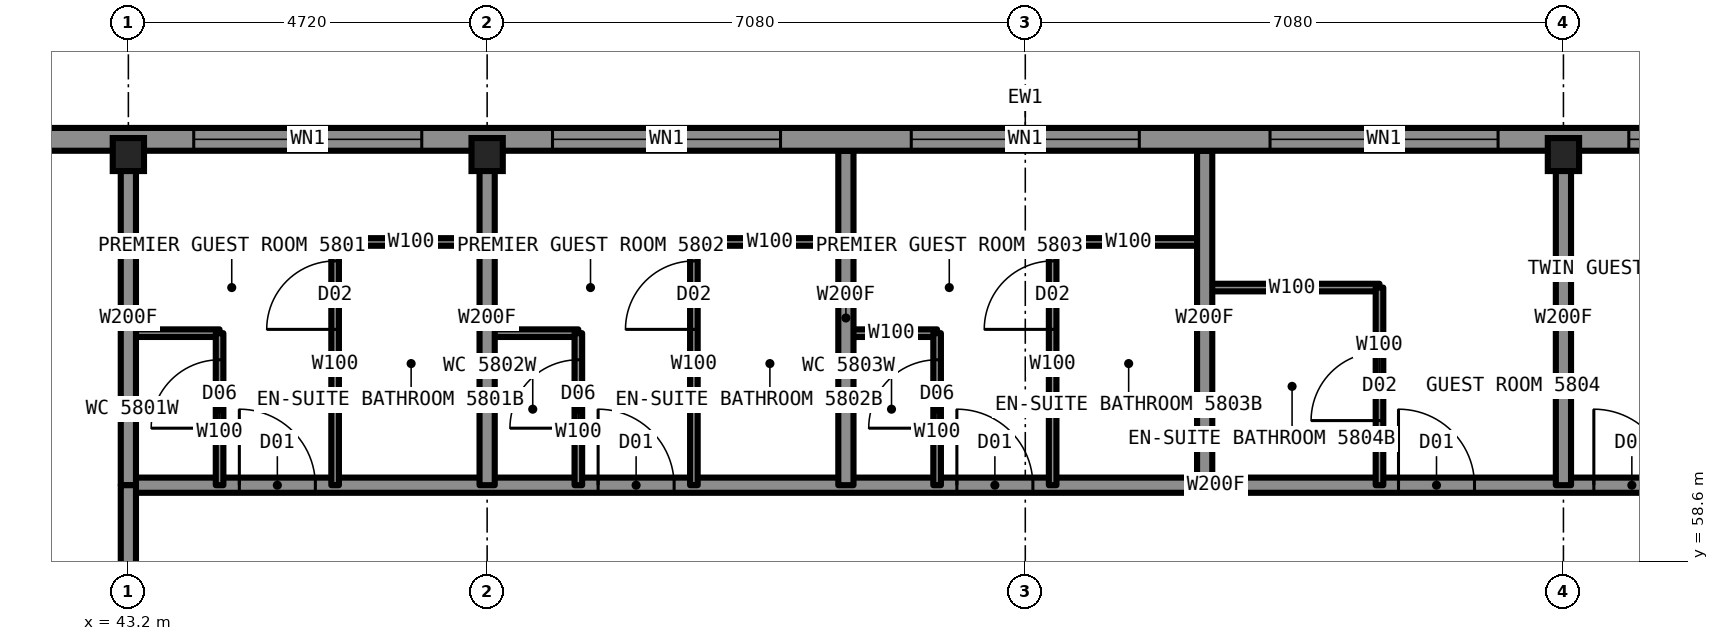
"""IFC4 building model, lengths in metres.
Left out: names, types, materials, properties, quantities, classifications, styles, units other than length and angle.
Written with IfcOpenShell. Run it as: python <this file> out.ifc"""

import sys

from ifc_helpers import new_model, si_unit, direction, frame, frame_2d, origin, origin_2d, place, context, subcontext, project, spatial, rectangle, i_section, extrude, element, fill, save


model = new_model("IFC4")
c1 = context("Model", 3, precision=1e-05, world=origin(), true_north=direction((0.0, 1.0)))
c2 = subcontext(c1, "Body", "Model", "MODEL_VIEW")
j1 = project(units=[si_unit("LENGTHUNIT", "METRE"), si_unit("PLANEANGLEUNIT", "RADIAN")], contexts=[c1])
p1 = place(None, origin())
s1 = spatial("IfcSite", under=j1, at=p1, CompositionType="ELEMENT")
p2 = place(p1, origin())
s2 = spatial("IfcBuilding", under=s1, at=p2, CompositionType="ELEMENT")
p3 = place(p2, frame((0.0, 0.0, 214.3)))
s3 = spatial("IfcBuildingStorey", under=s2, at=p3, CompositionType="ELEMENT", Elevation=214.3)
for number, where, z_axis, x_axis in (
    (1, (43.2, 63.95, 0.0), (0.0, 0.0, 1.0), (1.0, 0.0, 0.0)),
    (2, (47.92, 63.95, 0.0), (0.0, 0.0, 1.0), (1.0, 0.0, 0.0)),
    (3, (62.08, 63.95, 0.0), (0.0, 0.0, 1.0), (1.0, 0.0, 0.0)),
):
    element("IfcColumn", number, at=place(p3, frame(where, z_axis=z_axis, x_axis=x_axis)), inside=s3, PredefinedType="COLUMN", context=c2, shape_type="SweptSolid", body=[
        extrude(i_section(OverallWidth=0.411, OverallDepth=0.434, WebThickness=0.036, FlangeThickness=0.057, at=origin_2d()), origin(), (0.0, 0.0, 1.0), 3.5),
    ])
p4 = place(p3, frame((43.2, 59.6, 0.0), z_axis=(0.0, 0.0, 1.0), x_axis=(1.0, 0.0, 0.0)))
e4 = element("IfcWall", 4, at=p4, inside=s3, PredefinedType="PARTITIONING", context=c2, shape_type="SweptSolid", body=[
    extrude(rectangle(XDim=23.6, YDim=0.2, at=frame_2d((11.8, 0.0))), origin(), (0.0, 0.0, 1.0), 3.33),
])
p5 = place(p4, frame((1.46, 0.0, 0.0)))
e5 = element("IfcOpeningElement", 5, at=p5, cuts=e4, PredefinedType="OPENING", context=c2, shape_type="SweptSolid", body=[
    extrude(rectangle(XDim=1.0, YDim=2.2, at=frame_2d((0.5, 1.1))), frame((0.0, 0.11, 0.0), z_axis=(0.0, -1.0, 0.0), x_axis=(1.0, 0.0, 0.0)), (0.0, 0.0, 1.0), 0.22),
])
p6 = place(p4, frame((6.18, 0.0, 0.0)))
e6 = element("IfcOpeningElement", 6, at=p6, cuts=e4, PredefinedType="OPENING", context=c2, shape_type="SweptSolid", body=[
    extrude(rectangle(XDim=1.0, YDim=2.2, at=frame_2d((0.5, 1.1))), frame((0.0, 0.11, 0.0), z_axis=(0.0, -1.0, 0.0), x_axis=(1.0, 0.0, 0.0)), (0.0, 0.0, 1.0), 0.22),
])
p7 = place(p4, frame((10.9, 0.0, 0.0)))
e7 = element("IfcOpeningElement", 7, at=p7, cuts=e4, PredefinedType="OPENING", context=c2, shape_type="SweptSolid", body=[
    extrude(rectangle(XDim=1.0, YDim=2.2, at=frame_2d((0.5, 1.1))), frame((0.0, 0.11, 0.0), z_axis=(0.0, -1.0, 0.0), x_axis=(1.0, 0.0, 0.0)), (0.0, 0.0, 1.0), 0.22),
])
p8 = place(p4, frame((16.71, 0.0, 0.0)))
e8 = element("IfcOpeningElement", 8, at=p8, cuts=e4, PredefinedType="OPENING", context=c2, shape_type="SweptSolid", body=[
    extrude(rectangle(XDim=1.0, YDim=2.2, at=frame_2d((0.5, 1.1))), frame((0.0, 0.11, 0.0), z_axis=(0.0, -1.0, 0.0), x_axis=(1.0, 0.0, 0.0)), (0.0, 0.0, 1.0), 0.22),
])
p9 = place(p4, frame((19.28, 0.0, 0.0)))
e9 = element("IfcOpeningElement", 9, at=p9, cuts=e4, PredefinedType="OPENING", context=c2, shape_type="SweptSolid", body=[
    extrude(rectangle(XDim=1.0, YDim=2.2, at=frame_2d((0.5, 1.1))), frame((0.0, 0.11, 0.0), z_axis=(0.0, -1.0, 0.0), x_axis=(1.0, 0.0, 0.0)), (0.0, 0.0, 1.0), 0.22),
])
p10 = place(p3, frame((43.2, 61.6, 0.0), z_axis=(0.0, 0.0, 1.0), x_axis=(1.0, 0.0, 0.0)))
e10 = element("IfcWall", 10, at=p10, inside=s3, PredefinedType="PARTITIONING", context=c2, shape_type="SweptSolid", body=[
    extrude(rectangle(XDim=1.2, YDim=0.1, at=frame_2d((0.6, 0.0))), origin(), (0.0, 0.0, 1.0), 3.33),
])
for number, where, z_axis, x_axis in (
    (11, (47.92, 61.6, 0.0), (0.0, 0.0, 1.0), (1.0, 0.0, 0.0)),
    (12, (52.64, 61.6, 0.0), (0.0, 0.0, 1.0), (1.0, 0.0, 0.0)),
):
    element("IfcWall", number, at=place(p3, frame(where, z_axis=z_axis, x_axis=x_axis)), inside=s3, PredefinedType="PARTITIONING", context=c2, shape_type="SweptSolid", body=[
        extrude(rectangle(XDim=1.2, YDim=0.1, at=frame_2d((0.6, 0.0))), origin(), (0.0, 0.0, 1.0), 3.33),
    ])
p11 = place(p3, frame((57.36, 62.2, 0.0), z_axis=(0.0, 0.0, 1.0), x_axis=(1.0, 0.0, 0.0)))
e13 = element("IfcWall", 13, at=p11, inside=s3, PredefinedType="PARTITIONING", context=c2, shape_type="SweptSolid", body=[
    extrude(rectangle(XDim=2.3, YDim=0.1, at=frame_2d((1.15, 0.0))), origin(), (0.0, 0.0, 1.0), 3.33),
])
for number, where, z_axis, x_axis in (
    (14, (45.92, 62.8, 0.0), (0.0, 0.0, 1.0), (1.0, 0.0, 0.0)),
    (15, (50.64, 62.8, 0.0), (0.0, 0.0, 1.0), (1.0, 0.0, 0.0)),
    (16, (55.36, 62.8, 0.0), (0.0, 0.0, 1.0), (1.0, 0.0, 0.0)),
):
    element("IfcWall", number, at=place(p3, frame(where, z_axis=z_axis, x_axis=x_axis)), inside=s3, PredefinedType="PARTITIONING", context=c2, shape_type="SweptSolid", body=[
        extrude(rectangle(XDim=2.0, YDim=0.1, at=frame_2d((1.0, 0.0))), origin(), (0.0, 0.0, 1.0), 3.33),
    ])
p12 = place(p3, frame((53.84, 59.6, 0.0), z_axis=(0.0, 0.0, 1.0), x_axis=(0.0, 1.0, 0.0)))
e17 = element("IfcWall", 17, at=p12, inside=s3, PredefinedType="PARTITIONING", context=c2, shape_type="SweptSolid", body=[
    extrude(rectangle(XDim=2.0, YDim=0.1, at=frame_2d((1.0, 0.0))), origin(), (0.0, 0.0, 1.0), 3.33),
])
p13 = place(p12, frame((0.75, 0.0, 0.0)))
e18 = element("IfcOpeningElement", 18, at=p13, cuts=e17, PredefinedType="OPENING", context=c2, shape_type="SweptSolid", body=[
    extrude(rectangle(XDim=0.9, YDim=2.1, at=frame_2d((0.45, 1.05))), frame((0.0, 0.06, 0.0), z_axis=(0.0, -1.0, 0.0), x_axis=(1.0, 0.0, 0.0)), (0.0, 0.0, 1.0), 0.12),
])
p14 = place(p3, frame((44.4, 59.6, 0.0), z_axis=(0.0, 0.0, 1.0), x_axis=(0.0, 1.0, 0.0)))
e19 = element("IfcWall", 19, at=p14, inside=s3, PredefinedType="PARTITIONING", context=c2, shape_type="SweptSolid", body=[
    extrude(rectangle(XDim=2.0, YDim=0.1, at=frame_2d((1.0, 0.0))), origin(), (0.0, 0.0, 1.0), 3.33),
])
p15 = place(p14, frame((0.75, 0.0, 0.0)))
e20 = element("IfcOpeningElement", 20, at=p15, cuts=e19, PredefinedType="OPENING", context=c2, shape_type="SweptSolid", body=[
    extrude(rectangle(XDim=0.9, YDim=2.1, at=frame_2d((0.45, 1.05))), frame((0.0, 0.06, 0.0), z_axis=(0.0, -1.0, 0.0), x_axis=(1.0, 0.0, 0.0)), (0.0, 0.0, 1.0), 0.12),
])
p16 = place(p3, frame((43.2, 59.6, 0.0), z_axis=(0.0, 0.0, 1.0), x_axis=(0.0, 1.0, 0.0)))
e21 = element("IfcWall", 21, at=p16, inside=s3, PredefinedType="PARTITIONING", context=c2, shape_type="SweptSolid", body=[
    extrude(rectangle(XDim=4.4, YDim=0.2, at=frame_2d((2.2, 0.0))), origin(), (0.0, 0.0, 1.0), 2.573),
])
p17 = place(p3, frame((52.64, 59.6, 0.0), z_axis=(0.0, 0.0, 1.0), x_axis=(0.0, 1.0, 0.0)))
e22 = element("IfcWall", 22, at=p17, inside=s3, PredefinedType="PARTITIONING", context=c2, shape_type="SweptSolid", body=[
    extrude(rectangle(XDim=4.4, YDim=0.2, at=frame_2d((2.2, 0.0))), origin(), (0.0, 0.0, 1.0), 3.33),
])
p18 = place(p3, frame((50.64, 59.6, 0.0), z_axis=(0.0, 0.0, 1.0), x_axis=(0.0, 1.0, 0.0)))
e23 = element("IfcWall", 23, at=p18, inside=s3, PredefinedType="PARTITIONING", context=c2, shape_type="SweptSolid", body=[
    extrude(rectangle(XDim=3.2, YDim=0.1, at=frame_2d((1.6, 0.0))), origin(), (0.0, 0.0, 1.0), 3.33),
])
p19 = place(p18, frame((2.05, 0.0, 0.0)))
e24 = element("IfcOpeningElement", 24, at=p19, cuts=e23, PredefinedType="OPENING", context=c2, shape_type="SweptSolid", body=[
    extrude(rectangle(XDim=0.9, YDim=2.1, at=frame_2d((0.45, 1.05))), frame((0.0, 0.06, 0.0), z_axis=(0.0, -1.0, 0.0), x_axis=(1.0, 0.0, 0.0)), (0.0, 0.0, 1.0), 0.12),
])
p20 = place(p3, frame((49.12, 59.6, 0.0), z_axis=(0.0, 0.0, 1.0), x_axis=(0.0, 1.0, 0.0)))
e25 = element("IfcWall", 25, at=p20, inside=s3, PredefinedType="PARTITIONING", context=c2, shape_type="SweptSolid", body=[
    extrude(rectangle(XDim=2.0, YDim=0.1, at=frame_2d((1.0, 0.0))), origin(), (0.0, 0.0, 1.0), 3.33),
])
p21 = place(p20, frame((0.75, 0.0, 0.0)))
e26 = element("IfcOpeningElement", 26, at=p21, cuts=e25, PredefinedType="OPENING", context=c2, shape_type="SweptSolid", body=[
    extrude(rectangle(XDim=0.9, YDim=2.1, at=frame_2d((0.45, 1.05))), frame((0.0, 0.06, 0.0), z_axis=(0.0, -1.0, 0.0), x_axis=(1.0, 0.0, 0.0)), (0.0, 0.0, 1.0), 0.12),
])
p22 = place(p3, frame((47.92, 59.6, 0.0), z_axis=(0.0, 0.0, 1.0), x_axis=(0.0, 1.0, 0.0)))
e27 = element("IfcWall", 27, at=p22, inside=s3, PredefinedType="PARTITIONING", context=c2, shape_type="SweptSolid", body=[
    extrude(rectangle(XDim=4.4, YDim=0.2, at=frame_2d((2.2, 0.0))), origin(), (0.0, 0.0, 1.0), 2.573),
])
p23 = place(p3, frame((45.92, 59.6, 0.0), z_axis=(0.0, 0.0, 1.0), x_axis=(0.0, 1.0, 0.0)))
e28 = element("IfcWall", 28, at=p23, inside=s3, PredefinedType="PARTITIONING", context=c2, shape_type="SweptSolid", body=[
    extrude(rectangle(XDim=3.2, YDim=0.1, at=frame_2d((1.6, 0.0))), origin(), (0.0, 0.0, 1.0), 3.33),
])
p24 = place(p23, frame((2.05, 0.0, 0.0)))
e29 = element("IfcOpeningElement", 29, at=p24, cuts=e28, PredefinedType="OPENING", context=c2, shape_type="SweptSolid", body=[
    extrude(rectangle(XDim=0.9, YDim=2.1, at=frame_2d((0.45, 1.05))), frame((0.0, 0.06, 0.0), z_axis=(0.0, -1.0, 0.0), x_axis=(1.0, 0.0, 0.0)), (0.0, 0.0, 1.0), 0.12),
])
p25 = place(p3, frame((55.36, 59.6, 0.0), z_axis=(0.0, 0.0, 1.0), x_axis=(0.0, 1.0, 0.0)))
e30 = element("IfcWall", 30, at=p25, inside=s3, PredefinedType="PARTITIONING", context=c2, shape_type="SweptSolid", body=[
    extrude(rectangle(XDim=3.2, YDim=0.1, at=frame_2d((1.6, 0.0))), origin(), (0.0, 0.0, 1.0), 3.33),
])
p26 = place(p25, frame((2.05, 0.0, 0.0)))
e31 = element("IfcOpeningElement", 31, at=p26, cuts=e30, PredefinedType="OPENING", context=c2, shape_type="SweptSolid", body=[
    extrude(rectangle(XDim=0.9, YDim=2.1, at=frame_2d((0.45, 1.05))), frame((0.0, 0.06, 0.0), z_axis=(0.0, -1.0, 0.0), x_axis=(1.0, 0.0, 0.0)), (0.0, 0.0, 1.0), 0.12),
])
p27 = place(p3, frame((57.36, 59.6, 0.0), z_axis=(0.0, 0.0, 1.0), x_axis=(0.0, 1.0, 0.0)))
e32 = element("IfcWall", 32, at=p27, inside=s3, PredefinedType="PARTITIONING", context=c2, shape_type="SweptSolid", body=[
    extrude(rectangle(XDim=4.4, YDim=0.2, at=frame_2d((2.2, 0.0))), origin(), (0.0, 0.0, 1.0), 3.33),
])
p28 = place(p3, frame((59.66, 59.6, 0.0), z_axis=(0.0, 0.0, 1.0), x_axis=(0.0, 1.0, 0.0)))
e33 = element("IfcWall", 33, at=p28, inside=s3, PredefinedType="PARTITIONING", context=c2, shape_type="SweptSolid", body=[
    extrude(rectangle(XDim=2.6, YDim=0.1, at=frame_2d((1.3, 0.0))), origin(), (0.0, 0.0, 1.0), 3.33),
])
p29 = place(p28, frame((0.85, 0.0, 0.0)))
e34 = element("IfcOpeningElement", 34, at=p29, cuts=e33, PredefinedType="OPENING", context=c2, shape_type="SweptSolid", body=[
    extrude(rectangle(XDim=0.9, YDim=2.1, at=frame_2d((0.45, 1.05))), frame((0.0, 0.06, 0.0), z_axis=(0.0, -1.0, 0.0), x_axis=(1.0, 0.0, 0.0)), (0.0, 0.0, 1.0), 0.12),
])
p30 = place(p3, frame((62.08, 59.6, 0.0), z_axis=(0.0, 0.0, 1.0), x_axis=(0.0, 1.0, 0.0)))
e35 = element("IfcWall", 35, at=p30, inside=s3, PredefinedType="PARTITIONING", context=c2, shape_type="SweptSolid", body=[
    extrude(rectangle(XDim=4.4, YDim=0.2, at=frame_2d((2.2, 0.0))), origin(), (0.0, 0.0, 1.0), 2.573),
])
p31 = place(p3, frame((68.8, 64.15, 0.0), z_axis=(0.0, 0.0, 1.0), x_axis=(-1.0, 0.0, 0.0)))
e36 = element("IfcWall", 36, at=p31, inside=s3, PredefinedType="SOLIDWALL", context=c2, shape_type="SweptSolid", body=[
    extrude(rectangle(XDim=27.6, YDim=0.3, at=frame_2d((13.8, 0.0))), origin(), (0.0, 0.0, 1.0), 2.63),
])
p32 = place(p31, frame((2.86, 0.0, 0.3)))
e37 = element("IfcOpeningElement", 37, at=p32, cuts=e36, PredefinedType="OPENING", context=c2, shape_type="SweptSolid", body=[
    extrude(rectangle(XDim=3.0, YDim=2.0, at=frame_2d((1.5, 1.0))), frame((0.0, 0.16, 0.0), z_axis=(0.0, -1.0, 0.0), x_axis=(1.0, 0.0, 0.0)), (0.0, 0.0, 1.0), 0.32),
])
p33 = place(p31, frame((7.58, 0.0, 0.3)))
e38 = element("IfcOpeningElement", 38, at=p33, cuts=e36, PredefinedType="OPENING", context=c2, shape_type="SweptSolid", body=[
    extrude(rectangle(XDim=3.0, YDim=2.0, at=frame_2d((1.5, 1.0))), frame((0.0, 0.16, 0.0), z_axis=(0.0, -1.0, 0.0), x_axis=(1.0, 0.0, 0.0)), (0.0, 0.0, 1.0), 0.32),
])
p34 = place(p31, frame((12.3, 0.0, 0.3)))
e39 = element("IfcOpeningElement", 39, at=p34, cuts=e36, PredefinedType="OPENING", context=c2, shape_type="SweptSolid", body=[
    extrude(rectangle(XDim=3.0, YDim=2.0, at=frame_2d((1.5, 1.0))), frame((0.0, 0.16, 0.0), z_axis=(0.0, -1.0, 0.0), x_axis=(1.0, 0.0, 0.0)), (0.0, 0.0, 1.0), 0.32),
])
p35 = place(p31, frame((17.02, 0.0, 0.3)))
e40 = element("IfcOpeningElement", 40, at=p35, cuts=e36, PredefinedType="OPENING", context=c2, shape_type="SweptSolid", body=[
    extrude(rectangle(XDim=3.0, YDim=2.0, at=frame_2d((1.5, 1.0))), frame((0.0, 0.16, 0.0), z_axis=(0.0, -1.0, 0.0), x_axis=(1.0, 0.0, 0.0)), (0.0, 0.0, 1.0), 0.32),
])
p36 = place(p31, frame((21.74, 0.0, 0.3)))
e41 = element("IfcOpeningElement", 41, at=p36, cuts=e36, PredefinedType="OPENING", context=c2, shape_type="SweptSolid", body=[
    extrude(rectangle(XDim=3.0, YDim=2.0, at=frame_2d((1.5, 1.0))), frame((0.0, 0.16, 0.0), z_axis=(0.0, -1.0, 0.0), x_axis=(1.0, 0.0, 0.0)), (0.0, 0.0, 1.0), 0.32),
])
p37 = place(p3, frame((43.2, 56.78, 0.0), z_axis=(0.0, 0.0, 1.0), x_axis=(0.0, 1.0, 0.0)))
e42 = element("IfcWall", 42, at=p37, inside=s3, PredefinedType="PARTITIONING", context=c2, shape_type="SweptSolid", body=[
    extrude(rectangle(XDim=2.82, YDim=0.2, at=frame_2d((1.41, 0.0))), origin(), (0.0, 0.0, 1.0), 2.573),
])
p38 = place(p5, origin())
e43 = element("IfcDoor", 43, at=p38, inside=s3, OperationType="SINGLE_SWING_LEFT", PredefinedType="DOOR", context=c2, shape_type="SweptSolid", body=[
    extrude(rectangle(XDim=1.0, YDim=2.2, at=frame_2d((0.5, 1.1))), frame((0.0, 0.025, 0.0), z_axis=(0.0, -1.0, 0.0), x_axis=(1.0, 0.0, 0.0)), (0.0, 0.0, 1.0), 0.05),
])
fill(e5, e43)
p39 = place(p24, origin())
e44 = element("IfcDoor", 44, at=p39, inside=s3, OperationType="SINGLE_SWING_RIGHT", PredefinedType="DOOR", context=c2, shape_type="SweptSolid", body=[
    extrude(rectangle(XDim=0.9, YDim=2.1, at=frame_2d((0.45, 1.05))), frame((0.0, 0.025, 0.0), z_axis=(0.0, -1.0, 0.0), x_axis=(1.0, 0.0, 0.0)), (0.0, 0.0, 1.0), 0.05),
])
fill(e29, e44)
p40 = place(p15, origin())
e45 = element("IfcDoor", 45, at=p40, inside=s3, OperationType="SINGLE_SWING_LEFT", PredefinedType="DOOR", context=c2, shape_type="SweptSolid", body=[
    extrude(rectangle(XDim=0.9, YDim=2.1, at=frame_2d((0.45, 1.05))), frame((0.0, 0.025, 0.0), z_axis=(0.0, -1.0, 0.0), x_axis=(1.0, 0.0, 0.0)), (0.0, 0.0, 1.0), 0.05),
])
fill(e20, e45)
p41 = place(p6, origin())
e46 = element("IfcDoor", 46, at=p41, inside=s3, OperationType="SINGLE_SWING_LEFT", PredefinedType="DOOR", context=c2, shape_type="SweptSolid", body=[
    extrude(rectangle(XDim=1.0, YDim=2.2, at=frame_2d((0.5, 1.1))), frame((0.0, 0.025, 0.0), z_axis=(0.0, -1.0, 0.0), x_axis=(1.0, 0.0, 0.0)), (0.0, 0.0, 1.0), 0.05),
])
fill(e6, e46)
p42 = place(p19, origin())
e47 = element("IfcDoor", 47, at=p42, inside=s3, OperationType="SINGLE_SWING_RIGHT", PredefinedType="DOOR", context=c2, shape_type="SweptSolid", body=[
    extrude(rectangle(XDim=0.9, YDim=2.1, at=frame_2d((0.45, 1.05))), frame((0.0, 0.025, 0.0), z_axis=(0.0, -1.0, 0.0), x_axis=(1.0, 0.0, 0.0)), (0.0, 0.0, 1.0), 0.05),
])
fill(e24, e47)
p43 = place(p21, origin())
e48 = element("IfcDoor", 48, at=p43, inside=s3, OperationType="SINGLE_SWING_LEFT", PredefinedType="DOOR", context=c2, shape_type="SweptSolid", body=[
    extrude(rectangle(XDim=0.9, YDim=2.1, at=frame_2d((0.45, 1.05))), frame((0.0, 0.025, 0.0), z_axis=(0.0, -1.0, 0.0), x_axis=(1.0, 0.0, 0.0)), (0.0, 0.0, 1.0), 0.05),
])
fill(e26, e48)
p44 = place(p7, origin())
e49 = element("IfcDoor", 49, at=p44, inside=s3, OperationType="SINGLE_SWING_LEFT", PredefinedType="DOOR", context=c2, shape_type="SweptSolid", body=[
    extrude(rectangle(XDim=1.0, YDim=2.2, at=frame_2d((0.5, 1.1))), frame((0.0, 0.025, 0.0), z_axis=(0.0, -1.0, 0.0), x_axis=(1.0, 0.0, 0.0)), (0.0, 0.0, 1.0), 0.05),
])
fill(e7, e49)
p45 = place(p26, origin())
e50 = element("IfcDoor", 50, at=p45, inside=s3, OperationType="SINGLE_SWING_RIGHT", PredefinedType="DOOR", context=c2, shape_type="SweptSolid", body=[
    extrude(rectangle(XDim=0.9, YDim=2.1, at=frame_2d((0.45, 1.05))), frame((0.0, 0.025, 0.0), z_axis=(0.0, -1.0, 0.0), x_axis=(1.0, 0.0, 0.0)), (0.0, 0.0, 1.0), 0.05),
])
fill(e31, e50)
p46 = place(p13, origin())
e51 = element("IfcDoor", 51, at=p46, inside=s3, OperationType="SINGLE_SWING_LEFT", PredefinedType="DOOR", context=c2, shape_type="SweptSolid", body=[
    extrude(rectangle(XDim=0.9, YDim=2.1, at=frame_2d((0.45, 1.05))), frame((0.0, 0.025, 0.0), z_axis=(0.0, -1.0, 0.0), x_axis=(1.0, 0.0, 0.0)), (0.0, 0.0, 1.0), 0.05),
])
fill(e18, e51)
p47 = place(p8, origin())
e52 = element("IfcDoor", 52, at=p47, inside=s3, OperationType="SINGLE_SWING_LEFT", PredefinedType="DOOR", context=c2, shape_type="SweptSolid", body=[
    extrude(rectangle(XDim=1.0, YDim=2.2, at=frame_2d((0.5, 1.1))), frame((0.0, 0.025, 0.0), z_axis=(0.0, -1.0, 0.0), x_axis=(1.0, 0.0, 0.0)), (0.0, 0.0, 1.0), 0.05),
])
fill(e8, e52)
p48 = place(p29, origin())
e53 = element("IfcDoor", 53, at=p48, inside=s3, OperationType="SINGLE_SWING_RIGHT", PredefinedType="DOOR", context=c2, shape_type="SweptSolid", body=[
    extrude(rectangle(XDim=0.9, YDim=2.1, at=frame_2d((0.45, 1.05))), frame((0.0, 0.025, 0.0), z_axis=(0.0, -1.0, 0.0), x_axis=(1.0, 0.0, 0.0)), (0.0, 0.0, 1.0), 0.05),
])
fill(e34, e53)
p49 = place(p9, origin())
e54 = element("IfcDoor", 54, at=p49, inside=s3, OperationType="SINGLE_SWING_LEFT", PredefinedType="DOOR", context=c2, shape_type="SweptSolid", body=[
    extrude(rectangle(XDim=1.0, YDim=2.2, at=frame_2d((0.5, 1.1))), frame((0.0, 0.025, 0.0), z_axis=(0.0, -1.0, 0.0), x_axis=(1.0, 0.0, 0.0)), (0.0, 0.0, 1.0), 0.05),
])
fill(e9, e54)
p50 = place(p32, origin())
e55 = element("IfcWindow", 55, at=p50, inside=s3, PartitioningType="SINGLE_PANEL", PredefinedType="WINDOW", context=c2, shape_type="SweptSolid", body=[
    extrude(rectangle(XDim=3.0, YDim=2.0, at=frame_2d((1.5, 1.0))), frame((0.0, 0.13, 0.0), z_axis=(0.0, -1.0, 0.0), x_axis=(1.0, 0.0, 0.0)), (0.0, 0.0, 1.0), 0.06),
])
fill(e37, e55)
p51 = place(p33, origin())
e56 = element("IfcWindow", 56, at=p51, inside=s3, PartitioningType="SINGLE_PANEL", PredefinedType="WINDOW", context=c2, shape_type="SweptSolid", body=[
    extrude(rectangle(XDim=3.0, YDim=2.0, at=frame_2d((1.5, 1.0))), frame((0.0, 0.13, 0.0), z_axis=(0.0, -1.0, 0.0), x_axis=(1.0, 0.0, 0.0)), (0.0, 0.0, 1.0), 0.06),
])
fill(e38, e56)
p52 = place(p34, origin())
e57 = element("IfcWindow", 57, at=p52, inside=s3, PartitioningType="SINGLE_PANEL", PredefinedType="WINDOW", context=c2, shape_type="SweptSolid", body=[
    extrude(rectangle(XDim=3.0, YDim=2.0, at=frame_2d((1.5, 1.0))), frame((0.0, 0.13, 0.0), z_axis=(0.0, -1.0, 0.0), x_axis=(1.0, 0.0, 0.0)), (0.0, 0.0, 1.0), 0.06),
])
fill(e39, e57)
p53 = place(p35, origin())
e58 = element("IfcWindow", 58, at=p53, inside=s3, PartitioningType="SINGLE_PANEL", PredefinedType="WINDOW", context=c2, shape_type="SweptSolid", body=[
    extrude(rectangle(XDim=3.0, YDim=2.0, at=frame_2d((1.5, 1.0))), frame((0.0, 0.13, 0.0), z_axis=(0.0, -1.0, 0.0), x_axis=(1.0, 0.0, 0.0)), (0.0, 0.0, 1.0), 0.06),
])
fill(e40, e58)
p54 = place(p36, origin())
e59 = element("IfcWindow", 59, at=p54, inside=s3, PartitioningType="SINGLE_PANEL", PredefinedType="WINDOW", context=c2, shape_type="SweptSolid", body=[
    extrude(rectangle(XDim=3.0, YDim=2.0, at=frame_2d((1.5, 1.0))), frame((0.0, 0.13, 0.0), z_axis=(0.0, -1.0, 0.0), x_axis=(1.0, 0.0, 0.0)), (0.0, 0.0, 1.0), 0.06),
])
fill(e41, e59)
save(model, sys.argv[1])
